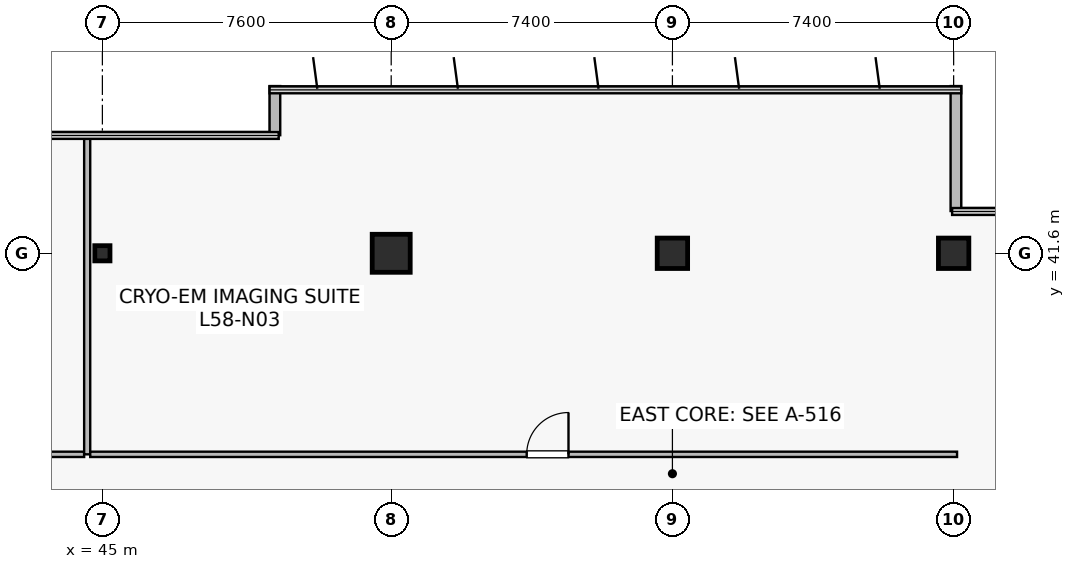
"""IFC4 building model, lengths in metres.
Left out: names, types, materials, properties, quantities, classifications, styles, units other than length and angle.
Written with IfcOpenShell. Run it as: python <this file> out.ifc"""

import sys

from ifc_helpers import new_model, si_unit, direction, frame, frame_2d, origin, origin_2d, place, context, subcontext, project, spatial, rectangle, hollow_rectangle, extrude, source, transform, mapped, element, fill, save


model = new_model("IFC4")
c1 = context("Model", 3, precision=1e-05, world=origin(), true_north=direction((0.0, 1.0)))
c2 = subcontext(c1, "Body", "Model", "MODEL_VIEW")
j1 = project(units=[si_unit("LENGTHUNIT", "METRE"), si_unit("PLANEANGLEUNIT", "RADIAN")], contexts=[c1])
p1 = place(None, origin())
s1 = spatial("IfcSite", under=j1, at=p1, CompositionType="ELEMENT")
p2 = place(p1, origin())
s2 = spatial("IfcBuilding", under=s1, at=p2, CompositionType="ELEMENT")
p3 = place(p2, frame((0.0, 0.0, 242.4)))
s3 = spatial("IfcBuildingStorey", under=s2, at=p3, CompositionType="ELEMENT", Elevation=242.4)
m1 = source(origin(), c2, "Body", "SweptSolid", [
    extrude(rectangle(XDim=1.0, YDim=1.0, at=origin_2d()), origin(), (0.0, 0.0, 1.0), 4.1),
])
p4 = place(p3, frame((52.6, 41.6, 0.0), z_axis=(0.0, 0.0, 1.0), x_axis=(1.0, 0.0, 0.0)))
e1 = element("IfcColumn", 1, at=p4, inside=s3, PredefinedType="COLUMN", context=c2, shape_type="MappedRepresentation", body=[
    mapped(m1, transform((0.0, 0.0, 0.0), scale=1.0)),
])
m2 = source(origin(), c2, "Body", "SweptSolid", [
    extrude(rectangle(XDim=0.8, YDim=0.8, at=origin_2d()), origin(), (0.0, 0.0, 1.0), 4.1),
])
for number, where, z_axis, x_axis in (
    (2, (60.0, 41.6, 0.0), (0.0, 0.0, 1.0), (1.0, 0.0, 0.0)),
    (3, (67.4, 41.6, 0.0), (0.0, 0.0, 1.0), (1.0, 0.0, 0.0)),
):
    element("IfcColumn", number, at=place(p3, frame(where, z_axis=z_axis, x_axis=x_axis)), inside=s3, PredefinedType="COLUMN", context=c2, shape_type="MappedRepresentation", body=[
        mapped(m2, transform((0.0, 0.0, 0.0), scale=1.0)),
    ])
m3 = source(origin(), c2, "Body", "SweptSolid", [
    extrude(hollow_rectangle(XDim=0.4, YDim=0.4, WallThickness=0.019, at=origin_2d()), origin(), (0.0, 0.0, 1.0), 4.1),
])
p5 = place(p3, frame((45.0, 41.6, 0.0), z_axis=(0.0, 0.0, 1.0), x_axis=(1.0, 0.0, 0.0)))
e4 = element("IfcColumn", 4, at=p5, inside=s3, PredefinedType="COLUMN", context=c2, shape_type="MappedRepresentation", body=[
    mapped(m3, transform((0.0, 0.0, 0.0), scale=1.0)),
])
p6 = place(p3, frame((67.46, 42.712, 0.0), z_axis=(0.0, 0.0, 1.0), x_axis=(0.0, 1.0, 0.0)))
e5 = element("IfcWall", 5, at=p6, inside=s3, PredefinedType="STANDARD", context=c2, shape_type="SweptSolid", body=[
    extrude(rectangle(XDim=3.288, YDim=0.28, at=frame_2d((1.644, 0.0))), origin(), (0.0, 0.0, 1.0), 3.8),
])
p7 = place(p3, frame((49.54, 46.0, 0.0), z_axis=(0.0, 0.0, 1.0), x_axis=(0.0, -1.0, 0.0)))
e6 = element("IfcWall", 6, at=p7, inside=s3, PredefinedType="STANDARD", context=c2, shape_type="SweptSolid", body=[
    extrude(rectangle(XDim=1.293, YDim=0.28, at=frame_2d((0.646, 0.0))), origin(), (0.0, 0.0, 1.0), 3.8),
])
p8 = place(p3, frame((21.28, 36.31, 0.0), z_axis=(0.0, 0.0, 1.0), x_axis=(1.0, 0.0, 0.0)))
e7 = element("IfcWall", 7, at=p8, inside=s3, PredefinedType="PARTITIONING", context=c2, shape_type="SweptSolid", body=[
    extrude(rectangle(XDim=23.24, YDim=0.14, at=frame_2d((11.62, 0.0))), origin(), (0.0, 0.0, 1.0), 3.197),
])
p9 = place(p8, frame((9.14, 0.0, 0.0)))
e8 = element("IfcOpeningElement", 8, at=p9, cuts=e7, PredefinedType="OPENING", context=c2, shape_type="SweptSolid", body=[
    extrude(rectangle(XDim=1.1, YDim=2.18, at=frame_2d((0.55, 1.09))), frame((0.0, 0.08, 0.0), z_axis=(0.0, -1.0, 0.0), x_axis=(1.0, 0.0, 0.0)), (0.0, 0.0, 1.0), 0.16),
])
p10 = place(p3, frame((44.6, 36.31, 0.0), z_axis=(0.0, 0.0, 1.0), x_axis=(0.0, 1.0, 0.0)))
e9 = element("IfcWall", 9, at=p10, inside=s3, PredefinedType="PARTITIONING", context=c2, shape_type="SweptSolid", body=[
    extrude(rectangle(XDim=8.38, YDim=0.16, at=frame_2d((4.19, 0.0))), origin(), (0.0, 0.0, 1.0), 3.135),
])
p11 = place(p3, frame((44.68, 36.31, 0.0), z_axis=(0.0, 0.0, 1.0), x_axis=(1.0, 0.0, 0.0)))
e10 = element("IfcWall", 10, at=p11, inside=s3, PredefinedType="PARTITIONING", context=c2, shape_type="SweptSolid", body=[
    extrude(rectangle(XDim=22.81, YDim=0.14, at=frame_2d((11.405, 0.0))), origin(), (0.0, 0.0, 1.0), 3.197),
])
p12 = place(p11, frame((11.485, 0.0, 0.0)))
e11 = element("IfcOpeningElement", 11, at=p12, cuts=e10, PredefinedType="OPENING", context=c2, shape_type="SweptSolid", body=[
    extrude(rectangle(XDim=1.1, YDim=2.18, at=frame_2d((0.55, 1.09))), frame((0.0, 0.08, 0.0), z_axis=(0.0, -1.0, 0.0), x_axis=(1.0, 0.0, 0.0)), (0.0, 0.0, 1.0), 0.16),
])
m4 = source(origin(), c2, "Body", "SweptSolid", [
    extrude(rectangle(XDim=1.1, YDim=2.18, at=frame_2d((0.55, 1.09))), frame((0.0, 0.025, 0.0), z_axis=(0.0, -1.0, 0.0), x_axis=(1.0, 0.0, 0.0)), (0.0, 0.0, 1.0), 0.05),
])
p13 = place(p12, origin())
e12 = element("IfcDoor", 12, at=p13, inside=s3, OperationType="SINGLE_SWING_RIGHT", PredefinedType="DOOR", context=c2, shape_type="MappedRepresentation", body=[
    mapped(m4, transform((0.0, 0.0, 0.0), scale=1.0)),
])
fill(e11, e12)
save(model, sys.argv[1])
